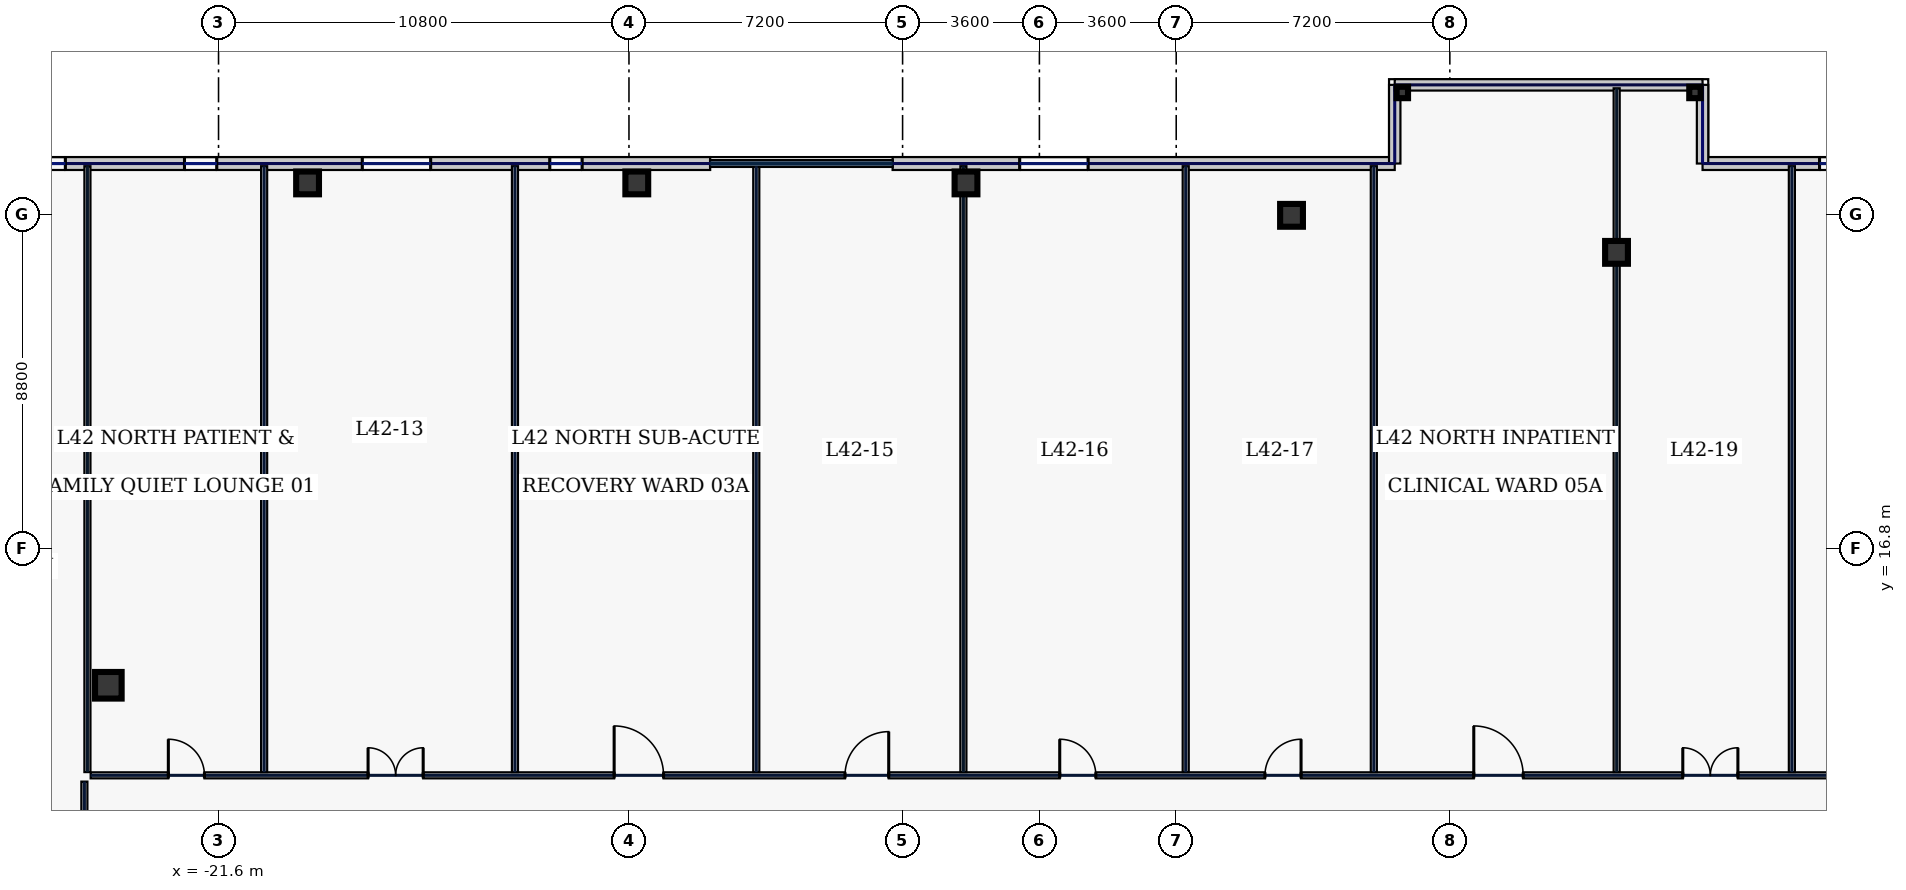
"""IFC4 building model, lengths in metres.
Left out: names, types, materials, properties, quantities, classifications, styles, units other than length and angle.
Written with IfcOpenShell. Run it as: python <this file> out.ifc"""

import sys

from ifc_helpers import new_model, si_unit, direction, frame, frame_2d, origin, origin_2d, place, context, subcontext, project, spatial, rectangle, hollow_rectangle, extrude, element, fill, save


model = new_model("IFC4")
c1 = context("Model", 3, precision=1e-05, world=origin(), true_north=direction((0.0, 1.0)))
c2 = subcontext(c1, "Body", "Model", "MODEL_VIEW")
j1 = project(units=[si_unit("LENGTHUNIT", "METRE"), si_unit("PLANEANGLEUNIT", "RADIAN")], contexts=[c1])
p1 = place(None, origin())
s1 = spatial("IfcSite", under=j1, at=p1, CompositionType="ELEMENT")
p2 = place(p1, origin())
s2 = spatial("IfcBuilding", under=s1, at=p2, CompositionType="ELEMENT")
p3 = place(p2, frame((0.0, 0.0, 184.2)))
s3 = spatial("IfcBuildingStorey", under=s2, at=p3, CompositionType="ELEMENT", Elevation=184.2)
p4 = place(p3, frame((-24.5, 13.2, 0.0), z_axis=(0.0, 0.0, 1.0), x_axis=(1.0, 0.0, 0.0)))
e1 = element("IfcColumn", 1, at=p4, inside=s3, PredefinedType="COLUMN", context=c2, shape_type="SweptSolid", body=[
    extrude(hollow_rectangle(XDim=0.7, YDim=0.7, WallThickness=0.032, at=origin_2d()), origin(), (0.0, 0.0, 1.0), 3.74),
])
for number, where, z_axis, x_axis in (
    (2, (15.186, 24.592, 0.0), (0.0, 0.0, 1.0), (1.0, 0.0, 0.0)),
    (3, (6.634, 25.567, 0.0), (0.0, 0.0, 1.0), (1.0, 0.0, 0.0)),
    (4, (-1.931, 26.42, 0.0), (0.0, 0.0, 1.0), (1.0, 0.0, 0.0)),
    (5, (-10.594, 26.42, 0.0), (0.0, 0.0, 1.0), (1.0, 0.0, 0.0)),
    (6, (-19.257, 26.42, 0.0), (0.0, 0.0, 1.0), (1.0, 0.0, 0.0)),
):
    element("IfcColumn", number, at=place(p3, frame(where, z_axis=z_axis, x_axis=x_axis)), inside=s3, PredefinedType="COLUMN", context=c2, shape_type="SweptSolid", body=[
        extrude(hollow_rectangle(XDim=0.6, YDim=0.6, WallThickness=0.028, at=origin_2d()), origin(), (0.0, 0.0, 1.0), 3.74),
    ])
for number, where, z_axis, x_axis in (
    (7, (9.55, 28.8, 0.0), (0.0, 0.0, 1.0), (1.0, 0.0, 0.0)),
    (8, (17.25, 28.8, 0.0), (0.0, 0.0, 1.0), (1.0, 0.0, 0.0)),
):
    element("IfcColumn", number, at=place(p3, frame(where, z_axis=z_axis, x_axis=x_axis)), inside=s3, PredefinedType="COLUMN", context=c2, shape_type="SweptSolid", body=[
        extrude(hollow_rectangle(XDim=0.3, YDim=0.3, WallThickness=0.016, at=origin_2d()), origin(), (0.0, 0.0, 1.0), 3.74),
    ])
p5 = place(p3, frame((33.4, 26.93, 0.0), z_axis=(0.0, 0.0, 1.0), x_axis=(-1.0, 0.0, 0.0)))
e9 = element("IfcWall", 9, at=p5, inside=s3, PredefinedType="STANDARD", context=c2, shape_type="SweptSolid", body=[
    extrude(rectangle(XDim=15.95, YDim=0.34, at=frame_2d((7.975, 0.0))), origin(), (0.0, 0.0, 1.0), 3.74),
])
p6 = place(p5, frame((11.071, 0.0, 0.7)))
e10 = element("IfcOpeningElement", 10, at=p6, cuts=e9, PredefinedType="OPENING", context=c2, shape_type="SweptSolid", body=[
    extrude(rectangle(XDim=1.8, YDim=2.2, at=frame_2d((0.9, 1.1))), frame((0.0, 0.18, 0.0), z_axis=(0.0, -1.0, 0.0), x_axis=(1.0, 0.0, 0.0)), (0.0, 0.0, 1.0), 0.36),
])
p7 = place(p5, frame((6.48, 0.0, 0.7)))
e11 = element("IfcOpeningElement", 11, at=p7, cuts=e9, PredefinedType="OPENING", context=c2, shape_type="SweptSolid", body=[
    extrude(rectangle(XDim=0.85, YDim=1.85, at=frame_2d((0.425, 0.925))), frame((0.0, 0.18, 0.0), z_axis=(0.0, -1.0, 0.0), x_axis=(1.0, 0.0, 0.0)), (0.0, 0.0, 1.0), 0.36),
])
p8 = place(p5, frame((2.591, 0.0, 0.7)))
e12 = element("IfcOpeningElement", 12, at=p8, cuts=e9, PredefinedType="OPENING", context=c2, shape_type="SweptSolid", body=[
    extrude(rectangle(XDim=1.8, YDim=2.2, at=frame_2d((0.9, 1.1))), frame((0.0, 0.18, 0.0), z_axis=(0.0, -1.0, 0.0), x_axis=(1.0, 0.0, 0.0)), (0.0, 0.0, 1.0), 0.36),
])
p9 = place(p3, frame((9.35, 26.93, 0.0), z_axis=(0.0, 0.0, 1.0), x_axis=(-1.0, 0.0, 0.0)))
e13 = element("IfcWall", 13, at=p9, inside=s3, PredefinedType="STANDARD", context=c2, shape_type="SweptSolid", body=[
    extrude(rectangle(XDim=13.213, YDim=0.34, at=frame_2d((6.606, 0.0))), origin(), (0.0, 0.0, 1.0), 3.74),
])
p10 = place(p9, frame((8.069, 0.0, 0.7)))
e14 = element("IfcOpeningElement", 14, at=p10, cuts=e13, PredefinedType="OPENING", context=c2, shape_type="SweptSolid", body=[
    extrude(rectangle(XDim=1.8, YDim=2.2, at=frame_2d((0.9, 1.1))), frame((0.0, 0.18, 0.0), z_axis=(0.0, -1.0, 0.0), x_axis=(1.0, 0.0, 0.0)), (0.0, 0.0, 1.0), 0.36),
])
p11 = place(p3, frame((-8.663, 26.93, 0.0), z_axis=(0.0, 0.0, 1.0), x_axis=(-1.0, 0.0, 0.0)))
e15 = element("IfcWall", 15, at=p11, inside=s3, PredefinedType="STANDARD", context=c2, shape_type="SweptSolid", body=[
    extrude(rectangle(XDim=19.937, YDim=0.34, at=frame_2d((9.969, 0.0))), origin(), (0.0, 0.0, 1.0), 3.74),
])
p12 = place(p11, frame((16.968, 0.0, 0.7)))
e16 = element("IfcOpeningElement", 16, at=p12, cuts=e15, PredefinedType="OPENING", context=c2, shape_type="SweptSolid", body=[
    extrude(rectangle(XDim=0.85, YDim=1.85, at=frame_2d((0.425, 0.925))), frame((0.0, 0.18, 0.0), z_axis=(0.0, -1.0, 0.0), x_axis=(1.0, 0.0, 0.0)), (0.0, 0.0, 1.0), 0.36),
])
p13 = place(p11, frame((12.983, 0.0, 0.7)))
e17 = element("IfcOpeningElement", 17, at=p13, cuts=e15, PredefinedType="OPENING", context=c2, shape_type="SweptSolid", body=[
    extrude(rectangle(XDim=0.85, YDim=1.85, at=frame_2d((0.425, 0.925))), frame((0.0, 0.18, 0.0), z_axis=(0.0, -1.0, 0.0), x_axis=(1.0, 0.0, 0.0)), (0.0, 0.0, 1.0), 0.36),
])
p14 = place(p11, frame((7.355, 0.0, 0.7)))
e18 = element("IfcOpeningElement", 18, at=p14, cuts=e15, PredefinedType="OPENING", context=c2, shape_type="SweptSolid", body=[
    extrude(rectangle(XDim=1.8, YDim=2.2, at=frame_2d((0.9, 1.1))), frame((0.0, 0.18, 0.0), z_axis=(0.0, -1.0, 0.0), x_axis=(1.0, 0.0, 0.0)), (0.0, 0.0, 1.0), 0.36),
])
p15 = place(p11, frame((3.371, 0.0, 0.7)))
e19 = element("IfcOpeningElement", 19, at=p15, cuts=e15, PredefinedType="OPENING", context=c2, shape_type="SweptSolid", body=[
    extrude(rectangle(XDim=0.85, YDim=1.85, at=frame_2d((0.425, 0.925))), frame((0.0, 0.18, 0.0), z_axis=(0.0, -1.0, 0.0), x_axis=(1.0, 0.0, 0.0)), (0.0, 0.0, 1.0), 0.36),
])
p16 = place(p3, frame((9.35, 26.93, 0.0), z_axis=(0.0, 0.0, 1.0), x_axis=(0.0, 1.0, 0.0)))
e20 = element("IfcWall", 20, at=p16, inside=s3, PredefinedType="STANDARD", context=c2, shape_type="SweptSolid", body=[
    extrude(rectangle(XDim=2.07, YDim=0.3, at=frame_2d((1.035, 0.0))), origin(), (0.0, 0.0, 1.0), 3.285),
])
p17 = place(p3, frame((17.45, 26.93, 0.0), z_axis=(0.0, 0.0, 1.0), x_axis=(0.0, 1.0, 0.0)))
e21 = element("IfcWall", 21, at=p17, inside=s3, PredefinedType="STANDARD", context=c2, shape_type="SweptSolid", body=[
    extrude(rectangle(XDim=2.07, YDim=0.3, at=frame_2d((1.035, 0.0))), origin(), (0.0, 0.0, 1.0), 3.74),
])
p18 = place(p3, frame((9.35, 29.0, 0.0), z_axis=(0.0, 0.0, 1.0), x_axis=(1.0, 0.0, 0.0)))
e22 = element("IfcWall", 22, at=p18, inside=s3, PredefinedType="STANDARD", context=c2, shape_type="SweptSolid", body=[
    extrude(rectangle(XDim=8.1, YDim=0.3, at=frame_2d((4.05, 0.0))), origin(), (0.0, 0.0, 1.0), 3.385),
])
p19 = place(p3, frame((-25.13, 7.685, 0.0), z_axis=(0.0, 0.0, 1.0), x_axis=(0.0, 1.0, 0.0)))
e23 = element("IfcWall", 23, at=p19, inside=s3, PredefinedType="PARTITIONING", context=c2, shape_type="SweptSolid", body=[
    extrude(rectangle(XDim=2.98, YDim=0.16, at=frame_2d((1.49, 0.0))), origin(), (0.0, 0.0, 1.0), 3.74),
])
p20 = place(p19, frame((1.1, 0.0, 0.0)))
e24 = element("IfcOpeningElement", 24, at=p20, cuts=e23, PredefinedType="OPENING", context=c2, shape_type="SweptSolid", body=[
    extrude(rectangle(XDim=0.95, YDim=2.2, at=frame_2d((0.475, 1.1))), frame((0.0, 0.09, 0.0), z_axis=(0.0, -1.0, 0.0), x_axis=(1.0, 0.0, 0.0)), (0.0, 0.0, 1.0), 0.18),
])
p21 = place(p3, frame((-24.965, 10.83, 0.0), z_axis=(0.0, 0.0, 1.0), x_axis=(1.0, 0.0, 0.0)))
e25 = element("IfcWall", 25, at=p21, inside=s3, PredefinedType="PARTITIONING", context=c2, shape_type="SweptSolid", body=[
    extrude(rectangle(XDim=49.93, YDim=0.16, at=frame_2d((24.965, 0.0))), origin(), (0.0, 0.0, 1.0), 3.74),
])
p22 = place(p21, frame((2.044, 0.0, 0.0)))
e26 = element("IfcOpeningElement", 26, at=p22, cuts=e25, PredefinedType="OPENING", context=c2, shape_type="SweptSolid", body=[
    extrude(rectangle(XDim=0.95, YDim=2.2, at=frame_2d((0.475, 1.1))), frame((0.0, 0.09, 0.0), z_axis=(0.0, -1.0, 0.0), x_axis=(1.0, 0.0, 0.0)), (0.0, 0.0, 1.0), 0.18),
])
p23 = place(p21, frame((7.3, 0.0, 0.0)))
e27 = element("IfcOpeningElement", 27, at=p23, cuts=e25, PredefinedType="OPENING", context=c2, shape_type="SweptSolid", body=[
    extrude(rectangle(XDim=1.45, YDim=2.2, at=frame_2d((0.725, 1.1))), frame((0.0, 0.09, 0.0), z_axis=(0.0, -1.0, 0.0), x_axis=(1.0, 0.0, 0.0)), (0.0, 0.0, 1.0), 0.18),
])
p24 = place(p21, frame((13.775, 0.0, 0.0)))
e28 = element("IfcOpeningElement", 28, at=p24, cuts=e25, PredefinedType="OPENING", context=c2, shape_type="SweptSolid", body=[
    extrude(rectangle(XDim=1.3, YDim=2.2, at=frame_2d((0.65, 1.1))), frame((0.0, 0.09, 0.0), z_axis=(0.0, -1.0, 0.0), x_axis=(1.0, 0.0, 0.0)), (0.0, 0.0, 1.0), 0.18),
])
p25 = place(p21, frame((19.85, 0.0, 0.0)))
e29 = element("IfcOpeningElement", 29, at=p25, cuts=e25, PredefinedType="OPENING", context=c2, shape_type="SweptSolid", body=[
    extrude(rectangle(XDim=1.15, YDim=2.2, at=frame_2d((0.575, 1.1))), frame((0.0, 0.09, 0.0), z_axis=(0.0, -1.0, 0.0), x_axis=(1.0, 0.0, 0.0)), (0.0, 0.0, 1.0), 0.18),
])
p26 = place(p21, frame((25.5, 0.0, 0.0)))
e30 = element("IfcOpeningElement", 30, at=p26, cuts=e25, PredefinedType="OPENING", context=c2, shape_type="SweptSolid", body=[
    extrude(rectangle(XDim=0.95, YDim=2.2, at=frame_2d((0.475, 1.1))), frame((0.0, 0.09, 0.0), z_axis=(0.0, -1.0, 0.0), x_axis=(1.0, 0.0, 0.0)), (0.0, 0.0, 1.0), 0.18),
])
p27 = place(p21, frame((30.9, 0.0, 0.0)))
e31 = element("IfcOpeningElement", 31, at=p27, cuts=e25, PredefinedType="OPENING", context=c2, shape_type="SweptSolid", body=[
    extrude(rectangle(XDim=0.95, YDim=2.2, at=frame_2d((0.475, 1.1))), frame((0.0, 0.09, 0.0), z_axis=(0.0, -1.0, 0.0), x_axis=(1.0, 0.0, 0.0)), (0.0, 0.0, 1.0), 0.18),
])
p28 = place(p21, frame((36.395, 0.0, 0.0)))
e32 = element("IfcOpeningElement", 32, at=p28, cuts=e25, PredefinedType="OPENING", context=c2, shape_type="SweptSolid", body=[
    extrude(rectangle(XDim=1.3, YDim=2.2, at=frame_2d((0.65, 1.1))), frame((0.0, 0.09, 0.0), z_axis=(0.0, -1.0, 0.0), x_axis=(1.0, 0.0, 0.0)), (0.0, 0.0, 1.0), 0.18),
])
p29 = place(p21, frame((41.895, 0.0, 0.0)))
e33 = element("IfcOpeningElement", 33, at=p29, cuts=e25, PredefinedType="OPENING", context=c2, shape_type="SweptSolid", body=[
    extrude(rectangle(XDim=1.45, YDim=2.2, at=frame_2d((0.725, 1.1))), frame((0.0, 0.09, 0.0), z_axis=(0.0, -1.0, 0.0), x_axis=(1.0, 0.0, 0.0)), (0.0, 0.0, 1.0), 0.18),
])
p30 = place(p21, frame((46.806, 0.0, 0.0)))
e34 = element("IfcOpeningElement", 34, at=p30, cuts=e25, PredefinedType="OPENING", context=c2, shape_type="SweptSolid", body=[
    extrude(rectangle(XDim=0.95, YDim=2.2, at=frame_2d((0.475, 1.1))), frame((0.0, 0.09, 0.0), z_axis=(0.0, -1.0, 0.0), x_axis=(1.0, 0.0, 0.0)), (0.0, 0.0, 1.0), 0.18),
])
p31 = place(p3, frame((-25.05, 10.915, 0.0), z_axis=(0.0, 0.0, 1.0), x_axis=(0.0, 1.0, 0.0)))
e35 = element("IfcWall", 35, at=p31, inside=s3, PredefinedType="PARTITIONING", context=c2, shape_type="SweptSolid", body=[
    extrude(rectangle(XDim=15.945, YDim=0.16, at=frame_2d((7.973, 0.0))), origin(), (0.0, 0.0, 1.0), 3.285),
])
for number, where, z_axis, x_axis in (
    (36, (-20.4, 10.915, 0.0), (0.0, 0.0, 1.0), (0.0, 1.0, 0.0)),
    (37, (-13.8, 10.915, 0.0), (0.0, 0.0, 1.0), (0.0, 1.0, 0.0)),
):
    element("IfcWall", number, at=place(p3, frame(where, z_axis=z_axis, x_axis=x_axis)), inside=s3, PredefinedType="PARTITIONING", context=c2, shape_type="SweptSolid", body=[
        extrude(rectangle(XDim=15.945, YDim=0.16, at=frame_2d((7.973, 0.0))), origin(), (0.0, 0.0, 1.0), 3.74),
    ])
p32 = place(p3, frame((-2.0, 10.915, 0.0), z_axis=(0.0, 0.0, 1.0), x_axis=(0.0, 1.0, 0.0)))
e38 = element("IfcWall", 38, at=p32, inside=s3, PredefinedType="PARTITIONING", context=c2, shape_type="SweptSolid", body=[
    extrude(rectangle(XDim=15.945, YDim=0.16, at=frame_2d((7.973, 0.0))), origin(), (0.0, 0.0, 1.0), 3.285),
])
for number, where, z_axis, x_axis in (
    (39, (8.8, 10.915, 0.0), (0.0, 0.0, 1.0), (0.0, 1.0, 0.0)),
    (40, (19.8, 10.915, 0.0), (0.0, 0.0, 1.0), (0.0, 1.0, 0.0)),
    (41, (-7.45, 10.915, 0.0), (0.0, 0.0, 1.0), (0.0, 1.0, 0.0)),
    (42, (3.85, 10.915, 0.0), (0.0, 0.0, 1.0), (0.0, 1.0, 0.0)),
):
    element("IfcWall", number, at=place(p3, frame(where, z_axis=z_axis, x_axis=x_axis)), inside=s3, PredefinedType="PARTITIONING", context=c2, shape_type="SweptSolid", body=[
        extrude(rectangle(XDim=15.945, YDim=0.16, at=frame_2d((7.973, 0.0))), origin(), (0.0, 0.0, 1.0), 3.74),
    ])
p33 = place(p3, frame((15.19, 10.915, 0.0), z_axis=(0.0, 0.0, 1.0), x_axis=(0.0, 1.0, 0.0)))
e43 = element("IfcWall", 43, at=p33, inside=s3, PredefinedType="PARTITIONING", context=c2, shape_type="SweptSolid", body=[
    extrude(rectangle(XDim=17.995, YDim=0.16, at=frame_2d((8.998, 0.0))), origin(), (0.0, 0.0, 1.0), 3.285),
])
p34 = place(p6, origin())
e44 = element("IfcWindow", 44, at=p34, inside=s3, PartitioningType="SINGLE_PANEL", PredefinedType="WINDOW", context=c2, shape_type="SweptSolid", body=[
    extrude(rectangle(XDim=1.8, YDim=2.2, at=frame_2d((0.9, 1.1))), frame((0.0, 0.03, 0.0), z_axis=(0.0, -1.0, 0.0), x_axis=(1.0, 0.0, 0.0)), (0.0, 0.0, 1.0), 0.06),
])
fill(e10, e44)
p35 = place(p10, origin())
e45 = element("IfcWindow", 45, at=p35, inside=s3, PartitioningType="SINGLE_PANEL", PredefinedType="WINDOW", context=c2, shape_type="SweptSolid", body=[
    extrude(rectangle(XDim=1.8, YDim=2.2, at=frame_2d((0.9, 1.1))), frame((0.0, 0.03, 0.0), z_axis=(0.0, -1.0, 0.0), x_axis=(1.0, 0.0, 0.0)), (0.0, 0.0, 1.0), 0.06),
])
fill(e14, e45)
p36 = place(p12, origin())
e46 = element("IfcWindow", 46, at=p36, inside=s3, PartitioningType="SINGLE_PANEL", PredefinedType="WINDOW", context=c2, shape_type="SweptSolid", body=[
    extrude(rectangle(XDim=0.85, YDim=1.85, at=frame_2d((0.425, 0.925))), frame((0.0, 0.03, 0.0), z_axis=(0.0, -1.0, 0.0), x_axis=(1.0, 0.0, 0.0)), (0.0, 0.0, 1.0), 0.06),
])
fill(e16, e46)
p37 = place(p13, origin())
e47 = element("IfcWindow", 47, at=p37, inside=s3, PartitioningType="SINGLE_PANEL", PredefinedType="WINDOW", context=c2, shape_type="SweptSolid", body=[
    extrude(rectangle(XDim=0.85, YDim=1.85, at=frame_2d((0.425, 0.925))), frame((0.0, 0.03, 0.0), z_axis=(0.0, -1.0, 0.0), x_axis=(1.0, 0.0, 0.0)), (0.0, 0.0, 1.0), 0.06),
])
fill(e17, e47)
p38 = place(p14, origin())
e48 = element("IfcWindow", 48, at=p38, inside=s3, PartitioningType="SINGLE_PANEL", PredefinedType="WINDOW", context=c2, shape_type="SweptSolid", body=[
    extrude(rectangle(XDim=1.8, YDim=2.2, at=frame_2d((0.9, 1.1))), frame((0.0, 0.03, 0.0), z_axis=(0.0, -1.0, 0.0), x_axis=(1.0, 0.0, 0.0)), (0.0, 0.0, 1.0), 0.06),
])
fill(e18, e48)
p39 = place(p15, origin())
e49 = element("IfcWindow", 49, at=p39, inside=s3, PartitioningType="SINGLE_PANEL", PredefinedType="WINDOW", context=c2, shape_type="SweptSolid", body=[
    extrude(rectangle(XDim=0.85, YDim=1.85, at=frame_2d((0.425, 0.925))), frame((0.0, 0.03, 0.0), z_axis=(0.0, -1.0, 0.0), x_axis=(1.0, 0.0, 0.0)), (0.0, 0.0, 1.0), 0.06),
])
fill(e19, e49)
p40 = place(p22, origin())
e50 = element("IfcDoor", 50, at=p40, inside=s3, OperationType="SINGLE_SWING_LEFT", PredefinedType="DOOR", context=c2, shape_type="SweptSolid", body=[
    extrude(rectangle(XDim=0.95, YDim=2.2, at=frame_2d((0.475, 1.1))), frame((0.0, 0.025, 0.0), z_axis=(0.0, -1.0, 0.0), x_axis=(1.0, 0.0, 0.0)), (0.0, 0.0, 1.0), 0.05),
])
fill(e26, e50)
p41 = place(p23, origin())
e51 = element("IfcDoor", 51, at=p41, inside=s3, OperationType="DOUBLE_SWING_LEFT", PredefinedType="DOOR", context=c2, shape_type="SweptSolid", body=[
    extrude(rectangle(XDim=1.45, YDim=2.2, at=frame_2d((0.725, 1.1))), frame((0.0, 0.025, 0.0), z_axis=(0.0, -1.0, 0.0), x_axis=(1.0, 0.0, 0.0)), (0.0, 0.0, 1.0), 0.05),
])
fill(e27, e51)
p42 = place(p24, origin())
e52 = element("IfcDoor", 52, at=p42, inside=s3, OperationType="SINGLE_SWING_LEFT", PredefinedType="DOOR", context=c2, shape_type="SweptSolid", body=[
    extrude(rectangle(XDim=1.3, YDim=2.2, at=frame_2d((0.65, 1.1))), frame((0.0, 0.025, 0.0), z_axis=(0.0, -1.0, 0.0), x_axis=(1.0, 0.0, 0.0)), (0.0, 0.0, 1.0), 0.05),
])
fill(e28, e52)
p43 = place(p25, origin())
e53 = element("IfcDoor", 53, at=p43, inside=s3, OperationType="SINGLE_SWING_RIGHT", PredefinedType="DOOR", context=c2, shape_type="SweptSolid", body=[
    extrude(rectangle(XDim=1.15, YDim=2.2, at=frame_2d((0.575, 1.1))), frame((0.0, 0.025, 0.0), z_axis=(0.0, -1.0, 0.0), x_axis=(1.0, 0.0, 0.0)), (0.0, 0.0, 1.0), 0.05),
])
fill(e29, e53)
p44 = place(p26, origin())
e54 = element("IfcDoor", 54, at=p44, inside=s3, OperationType="SINGLE_SWING_LEFT", PredefinedType="DOOR", context=c2, shape_type="SweptSolid", body=[
    extrude(rectangle(XDim=0.95, YDim=2.2, at=frame_2d((0.475, 1.1))), frame((0.0, 0.025, 0.0), z_axis=(0.0, -1.0, 0.0), x_axis=(1.0, 0.0, 0.0)), (0.0, 0.0, 1.0), 0.05),
])
fill(e30, e54)
p45 = place(p27, origin())
e55 = element("IfcDoor", 55, at=p45, inside=s3, OperationType="SINGLE_SWING_RIGHT", PredefinedType="DOOR", context=c2, shape_type="SweptSolid", body=[
    extrude(rectangle(XDim=0.95, YDim=2.2, at=frame_2d((0.475, 1.1))), frame((0.0, 0.025, 0.0), z_axis=(0.0, -1.0, 0.0), x_axis=(1.0, 0.0, 0.0)), (0.0, 0.0, 1.0), 0.05),
])
fill(e31, e55)
p46 = place(p28, origin())
e56 = element("IfcDoor", 56, at=p46, inside=s3, OperationType="SINGLE_SWING_LEFT", PredefinedType="DOOR", context=c2, shape_type="SweptSolid", body=[
    extrude(rectangle(XDim=1.3, YDim=2.2, at=frame_2d((0.65, 1.1))), frame((0.0, 0.025, 0.0), z_axis=(0.0, -1.0, 0.0), x_axis=(1.0, 0.0, 0.0)), (0.0, 0.0, 1.0), 0.05),
])
fill(e32, e56)
p47 = place(p29, origin())
e57 = element("IfcDoor", 57, at=p47, inside=s3, OperationType="DOUBLE_SWING_LEFT", PredefinedType="DOOR", context=c2, shape_type="SweptSolid", body=[
    extrude(rectangle(XDim=1.45, YDim=2.2, at=frame_2d((0.725, 1.1))), frame((0.0, 0.025, 0.0), z_axis=(0.0, -1.0, 0.0), x_axis=(1.0, 0.0, 0.0)), (0.0, 0.0, 1.0), 0.05),
])
fill(e33, e57)
save(model, sys.argv[1])
